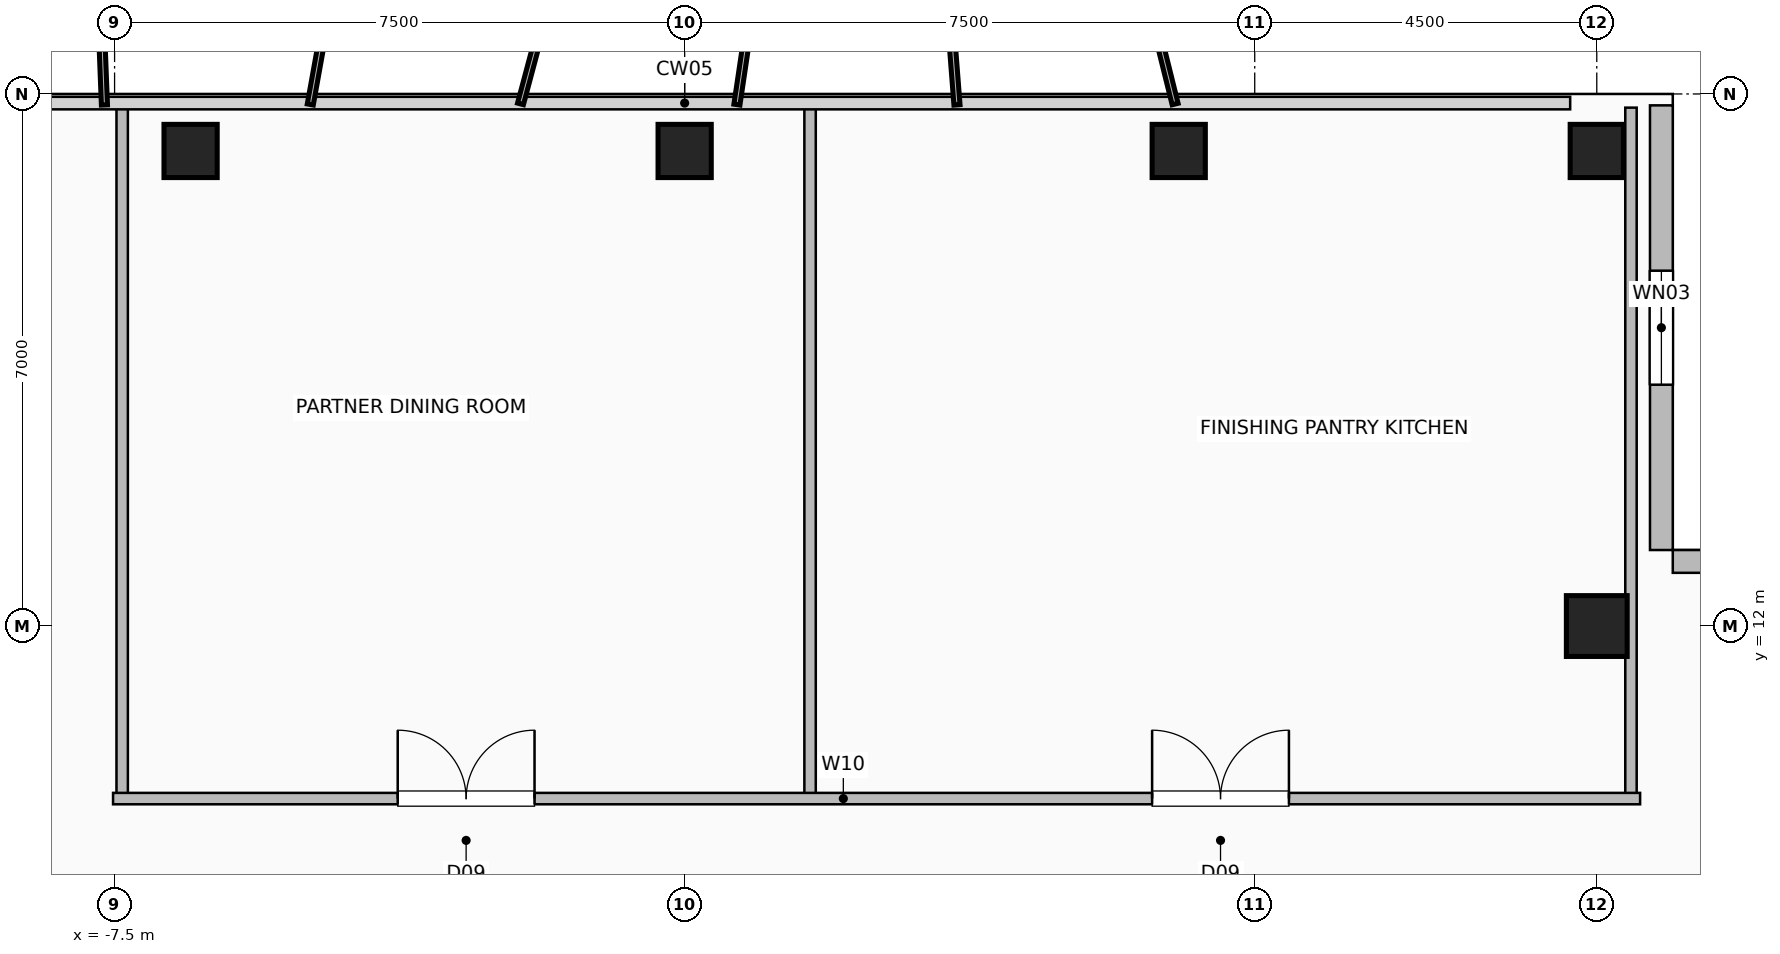
"""IFC4 building model, lengths in metres.
Left out: names, types, materials, properties, quantities, classifications, styles, units other than length and angle.
Written with IfcOpenShell. Run it as: python <this file> out.ifc"""

import sys

from ifc_helpers import new_model, si_unit, direction, frame, frame_2d, origin, origin_2d, place, context, subcontext, project, spatial, rectangle, hollow_rectangle, extrude, element, fill, save


model = new_model("IFC4")
c1 = context("Model", 3, precision=1e-05, world=origin(), true_north=direction((0.0, 1.0)))
c2 = subcontext(c1, "Body", "Model", "MODEL_VIEW")
j1 = project(units=[si_unit("LENGTHUNIT", "METRE"), si_unit("PLANEANGLEUNIT", "RADIAN")], contexts=[c1])
p1 = place(None, origin())
s1 = spatial("IfcSite", under=j1, at=p1, CompositionType="ELEMENT")
p2 = place(p1, origin())
s2 = spatial("IfcBuilding", under=s1, at=p2, CompositionType="ELEMENT")
p3 = place(p2, frame((0.0, 0.0, 282.8)))
s3 = spatial("IfcBuildingStorey", under=s2, at=p3, CompositionType="ELEMENT", Elevation=282.8)
for number, where, z_axis, x_axis in (
    (1, (-6.5, 18.25, 0.0), (0.0, 0.0, 1.0), (1.0, 0.0, 0.0)),
    (2, (0.0, 18.25, 0.0), (0.0, 0.0, 1.0), (1.0, 0.0, 0.0)),
    (3, (6.5, 18.25, 0.0), (0.0, 0.0, 1.0), (1.0, 0.0, 0.0)),
    (4, (12.0, 18.25, 0.0), (0.0, 0.0, 1.0), (1.0, 0.0, 0.0)),
):
    element("IfcColumn", number, at=place(p3, frame(where, z_axis=z_axis, x_axis=x_axis)), inside=s3, PredefinedType="COLUMN", context=c2, shape_type="SweptSolid", body=[
        extrude(hollow_rectangle(XDim=0.7, YDim=0.7, WallThickness=0.035, at=origin_2d()), origin(), (0.0, 0.0, 1.0), 3.6),
    ])
p4 = place(p3, frame((12.0, 12.0, 0.0), z_axis=(0.0, 0.0, 1.0), x_axis=(1.0, 0.0, 0.0)))
e5 = element("IfcColumn", 5, at=p4, inside=s3, PredefinedType="COLUMN", context=c2, shape_type="SweptSolid", body=[
    extrude(hollow_rectangle(XDim=0.8, YDim=0.8, WallThickness=0.04, at=origin_2d()), origin(), (0.0, 0.0, 1.0), 3.6),
])
p5 = place(p3, frame((12.85, 18.85, 0.0), z_axis=(0.0, 0.0, 1.0), x_axis=(0.0, -1.0, 0.0)))
e6 = element("IfcWall", 6, at=p5, inside=s3, PredefinedType="SOLIDWALL", context=c2, shape_type="SweptSolid", body=[
    extrude(rectangle(XDim=5.85, YDim=0.3, at=frame_2d((2.925, 0.0))), origin(), (0.0, 0.0, 1.0), 3.36),
])
p6 = place(p5, frame((2.175, 0.0, 0.9)))
e7 = element("IfcOpeningElement", 7, at=p6, cuts=e6, PredefinedType="OPENING", context=c2, shape_type="SweptSolid", body=[
    extrude(rectangle(XDim=1.5, YDim=1.8, at=frame_2d((0.75, 0.9))), frame((0.0, 0.16, 0.0), z_axis=(0.0, -1.0, 0.0), x_axis=(1.0, 0.0, 0.0)), (0.0, 0.0, 1.0), 0.32),
])
p7 = place(p3, frame((18.85, 12.85, 0.0), z_axis=(0.0, 0.0, 1.0), x_axis=(-1.0, 0.0, 0.0)))
e8 = element("IfcWall", 8, at=p7, inside=s3, PredefinedType="SOLIDWALL", context=c2, shape_type="SweptSolid", body=[
    extrude(rectangle(XDim=5.85, YDim=0.3, at=frame_2d((2.925, 0.0))), origin(), (0.0, 0.0, 1.0), 3.36),
])
for number, where, z_axis, x_axis in (
    (9, (-7.4, 9.73, 0.0), (0.0, 0.0, 1.0), (0.0, 1.0, 0.0)),
    (10, (1.65, 9.73, 0.0), (0.0, 0.0, 1.0), (0.0, 1.0, 0.0)),
    (11, (12.45, 9.73, 0.0), (0.0, 0.0, 1.0), (0.0, 1.0, 0.0)),
):
    element("IfcWall", number, at=place(p3, frame(where, z_axis=z_axis, x_axis=x_axis)), inside=s3, PredefinedType="PARTITIONING", context=c2, shape_type="SweptSolid", body=[
        extrude(rectangle(XDim=9.09, YDim=0.15, at=frame_2d((4.545, 0.0))), origin(), (0.0, 0.0, 1.0), 3.36),
    ])
p8 = place(p3, frame((-7.52, 9.73, 0.0), z_axis=(0.0, 0.0, 1.0), x_axis=(1.0, 0.0, 0.0)))
e12 = element("IfcWall", 12, at=p8, inside=s3, PredefinedType="PARTITIONING", context=c2, shape_type="SweptSolid", body=[
    extrude(rectangle(XDim=20.09, YDim=0.15, at=frame_2d((10.045, 0.0))), origin(), (0.0, 0.0, 1.0), 3.36),
])
p9 = place(p8, frame((3.745, 0.0, 0.0)))
e13 = element("IfcOpeningElement", 13, at=p9, cuts=e12, PredefinedType="OPENING", context=c2, shape_type="SweptSolid", body=[
    extrude(rectangle(XDim=1.8, YDim=2.08, at=frame_2d((0.9, 1.04))), frame((0.0, 0.085, 0.0), z_axis=(0.0, -1.0, 0.0), x_axis=(1.0, 0.0, 0.0)), (0.0, 0.0, 1.0), 0.17),
])
p10 = place(p8, frame((13.67, 0.0, 0.0)))
e14 = element("IfcOpeningElement", 14, at=p10, cuts=e12, PredefinedType="OPENING", context=c2, shape_type="SweptSolid", body=[
    extrude(rectangle(XDim=1.8, YDim=2.08, at=frame_2d((0.9, 1.04))), frame((0.0, 0.085, 0.0), z_axis=(0.0, -1.0, 0.0), x_axis=(1.0, 0.0, 0.0)), (0.0, 0.0, 1.0), 0.17),
])
p11 = place(p6, origin())
e15 = element("IfcWindow", 15, at=p11, inside=s3, PartitioningType="SINGLE_PANEL", PredefinedType="WINDOW", context=c2, shape_type="SweptSolid", body=[
    extrude(rectangle(XDim=1.5, YDim=1.8, at=frame_2d((0.75, 0.9))), frame((0.0, 0.03, 0.0), z_axis=(0.0, -1.0, 0.0), x_axis=(1.0, 0.0, 0.0)), (0.0, 0.0, 1.0), 0.06),
])
fill(e7, e15)
p12 = place(p9, origin())
e16 = element("IfcDoor", 16, at=p12, inside=s3, OperationType="DOUBLE_DOOR_SINGLE_SWING", PredefinedType="DOOR", context=c2, shape_type="SweptSolid", body=[
    extrude(rectangle(XDim=1.8, YDim=2.08, at=frame_2d((0.9, 1.04))), frame((0.0, 0.025, 0.0), z_axis=(0.0, -1.0, 0.0), x_axis=(1.0, 0.0, 0.0)), (0.0, 0.0, 1.0), 0.05),
])
fill(e13, e16)
p13 = place(p10, origin())
e17 = element("IfcDoor", 17, at=p13, inside=s3, OperationType="DOUBLE_DOOR_SINGLE_SWING", PredefinedType="DOOR", context=c2, shape_type="SweptSolid", body=[
    extrude(rectangle(XDim=1.8, YDim=2.08, at=frame_2d((0.9, 1.04))), frame((0.0, 0.025, 0.0), z_axis=(0.0, -1.0, 0.0), x_axis=(1.0, 0.0, 0.0)), (0.0, 0.0, 1.0), 0.05),
])
fill(e14, e17)
save(model, sys.argv[1])
